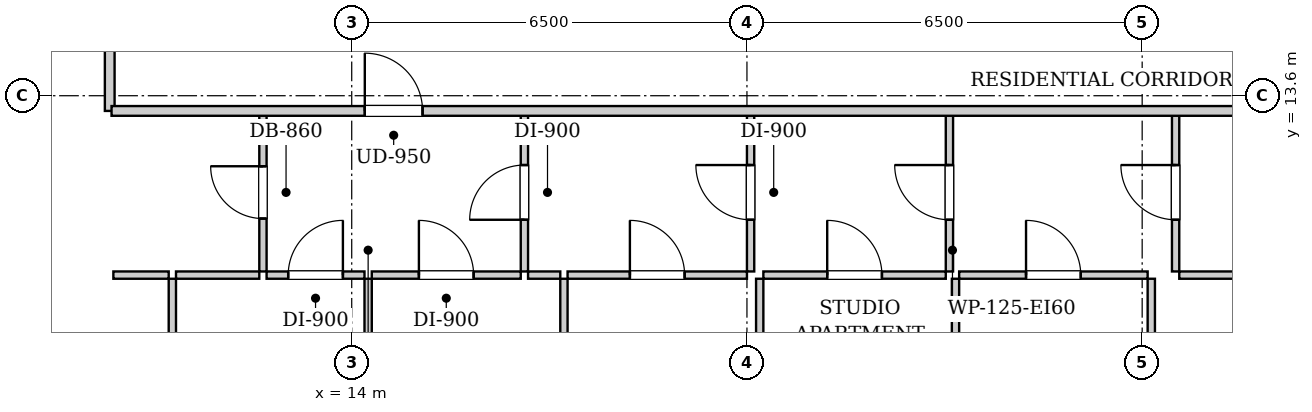
"""IFC4 building model, lengths in metres.
Left out: names, types, materials, properties, quantities, classifications, styles, units other than length and angle.
Written with IfcOpenShell. Run it as: python <this file> out.ifc"""

import sys

from ifc_helpers import new_model, si_unit, direction, frame, frame_2d, origin, place, context, subcontext, project, spatial, rectangle, extrude, element, fill, save


model = new_model("IFC4")
c1 = context("Model", 3, precision=1e-05, world=origin(), true_north=direction((0.0, 1.0)))
c2 = subcontext(c1, "Body", "Model", "MODEL_VIEW")
j1 = project(units=[si_unit("LENGTHUNIT", "METRE"), si_unit("PLANEANGLEUNIT", "RADIAN")], contexts=[c1])
p1 = place(None, origin())
s1 = spatial("IfcSite", under=j1, at=p1, CompositionType="ELEMENT")
p2 = place(p1, origin())
s2 = spatial("IfcBuilding", under=s1, at=p2, CompositionType="ELEMENT")
p3 = place(p2, frame((0.0, 0.0, 29.0)))
s3 = spatial("IfcBuildingStorey", under=s2, at=p3, CompositionType="ELEMENT", Elevation=29.0)
p4 = place(p3, frame((10.02, 13.35, 0.0), z_axis=(0.0, 0.0, 1.0), x_axis=(0.0, 1.0, 0.0)))
e1 = element("IfcWall", 1, at=p4, inside=s3, PredefinedType="PARTITIONING", context=c2, shape_type="SweptSolid", body=[
    extrude(rectangle(XDim=1.74, YDim=0.16, at=frame_2d((0.87, 0.0))), origin(), (0.0, 0.0, 1.0), 2.94),
])
p5 = place(p3, frame((12.54, 10.71, 0.0), z_axis=(0.0, 0.0, 1.0), x_axis=(0.0, 1.0, 0.0)))
e2 = element("IfcWall", 2, at=p5, inside=s3, PredefinedType="PARTITIONING", context=c2, shape_type="SweptSolid", body=[
    extrude(rectangle(XDim=2.6, YDim=0.12, at=frame_2d((1.3, 0.0))), origin(), (0.0, 0.0, 1.0), 2.94),
])
p6 = place(p5, frame((0.87, 0.0, 0.0)))
e3 = element("IfcOpeningElement", 3, at=p6, cuts=e2, PredefinedType="OPENING", context=c2, shape_type="SweptSolid", body=[
    extrude(rectangle(XDim=0.86, YDim=2.05, at=frame_2d((0.43, 1.025))), frame((0.0, 0.07, 0.0), z_axis=(0.0, -1.0, 0.0), x_axis=(1.0, 0.0, 0.0)), (0.0, 0.0, 1.0), 0.14),
])
p7 = place(p3, frame((10.08, 10.65, 0.0), z_axis=(0.0, 0.0, 1.0), x_axis=(1.0, 0.0, 0.0)))
e4 = element("IfcWall", 4, at=p7, inside=s3, PredefinedType="PARTITIONING", context=c2, shape_type="SweptSolid", body=[
    extrude(rectangle(XDim=0.91, YDim=0.12, at=frame_2d((0.455, 0.0))), origin(), (0.0, 0.0, 1.0), 2.94),
])
p8 = place(p3, frame((11.11, 10.65, 0.0), z_axis=(0.0, 0.0, 1.0), x_axis=(1.0, 0.0, 0.0)))
e5 = element("IfcWall", 5, at=p8, inside=s3, PredefinedType="PARTITIONING", context=c2, shape_type="SweptSolid", body=[
    extrude(rectangle(XDim=1.37, YDim=0.12, at=frame_2d((0.685, 0.0))), origin(), (0.0, 0.0, 1.0), 2.94),
])
p9 = place(p3, frame((16.84, 10.71, 0.0), z_axis=(0.0, 0.0, 1.0), x_axis=(0.0, 1.0, 0.0)))
e6 = element("IfcWall", 6, at=p9, inside=s3, PredefinedType="PARTITIONING", context=c2, shape_type="SweptSolid", body=[
    extrude(rectangle(XDim=2.6, YDim=0.12, at=frame_2d((1.3, 0.0))), origin(), (0.0, 0.0, 1.0), 2.94),
])
p10 = place(p9, frame((0.85, 0.0, 0.0)))
e7 = element("IfcOpeningElement", 7, at=p10, cuts=e6, PredefinedType="OPENING", context=c2, shape_type="SweptSolid", body=[
    extrude(rectangle(XDim=0.9, YDim=2.05, at=frame_2d((0.45, 1.025))), frame((0.0, 0.07, 0.0), z_axis=(0.0, -1.0, 0.0), x_axis=(1.0, 0.0, 0.0)), (0.0, 0.0, 1.0), 0.14),
])
p11 = place(p3, frame((12.6, 10.65, 0.0), z_axis=(0.0, 0.0, 1.0), x_axis=(1.0, 0.0, 0.0)))
e8 = element("IfcWall", 8, at=p11, inside=s3, PredefinedType="PARTITIONING", context=c2, shape_type="SweptSolid", body=[
    extrude(rectangle(XDim=1.61, YDim=0.12, at=frame_2d((0.805, 0.0))), origin(), (0.0, 0.0, 1.0), 2.94),
])
p12 = place(p11, frame((0.355, 0.0, 0.0)))
e9 = element("IfcOpeningElement", 9, at=p12, cuts=e8, PredefinedType="OPENING", context=c2, shape_type="SweptSolid", body=[
    extrude(rectangle(XDim=0.9, YDim=2.05, at=frame_2d((0.45, 1.025))), frame((0.0, 0.07, 0.0), z_axis=(0.0, -1.0, 0.0), x_axis=(1.0, 0.0, 0.0)), (0.0, 0.0, 1.0), 0.14),
])
p13 = place(p3, frame((14.33, 10.65, 0.0), z_axis=(0.0, 0.0, 1.0), x_axis=(1.0, 0.0, 0.0)))
e10 = element("IfcWall", 10, at=p13, inside=s3, PredefinedType="PARTITIONING", context=c2, shape_type="SweptSolid", body=[
    extrude(rectangle(XDim=2.45, YDim=0.12, at=frame_2d((1.225, 0.0))), origin(), (0.0, 0.0, 1.0), 2.94),
])
p14 = place(p13, frame((0.775, 0.0, 0.0)))
e11 = element("IfcOpeningElement", 11, at=p14, cuts=e10, PredefinedType="OPENING", context=c2, shape_type="SweptSolid", body=[
    extrude(rectangle(XDim=0.9, YDim=2.05, at=frame_2d((0.45, 1.025))), frame((0.0, 0.07, 0.0), z_axis=(0.0, -1.0, 0.0), x_axis=(1.0, 0.0, 0.0)), (0.0, 0.0, 1.0), 0.14),
])
p15 = place(p3, frame((20.56, 10.71, 0.0), z_axis=(0.0, 0.0, 1.0), x_axis=(0.0, 1.0, 0.0)))
e12 = element("IfcWall", 12, at=p15, inside=s3, PredefinedType="PARTITIONING", context=c2, shape_type="SweptSolid", body=[
    extrude(rectangle(XDim=2.6, YDim=0.12, at=frame_2d((1.3, 0.0))), origin(), (0.0, 0.0, 1.0), 2.94),
])
p16 = place(p15, frame((0.85, 0.0, 0.0)))
e13 = element("IfcOpeningElement", 13, at=p16, cuts=e12, PredefinedType="OPENING", context=c2, shape_type="SweptSolid", body=[
    extrude(rectangle(XDim=0.9, YDim=2.05, at=frame_2d((0.45, 1.025))), frame((0.0, 0.07, 0.0), z_axis=(0.0, -1.0, 0.0), x_axis=(1.0, 0.0, 0.0)), (0.0, 0.0, 1.0), 0.14),
])
p17 = place(p3, frame((16.9, 10.65, 0.0), z_axis=(0.0, 0.0, 1.0), x_axis=(1.0, 0.0, 0.0)))
e14 = element("IfcWall", 14, at=p17, inside=s3, PredefinedType="PARTITIONING", context=c2, shape_type="SweptSolid", body=[
    extrude(rectangle(XDim=0.53, YDim=0.12, at=frame_2d((0.265, 0.0))), origin(), (0.0, 0.0, 1.0), 2.94),
])
p18 = place(p3, frame((17.55, 10.65, 0.0), z_axis=(0.0, 0.0, 1.0), x_axis=(1.0, 0.0, 0.0)))
e15 = element("IfcWall", 15, at=p18, inside=s3, PredefinedType="PARTITIONING", context=c2, shape_type="SweptSolid", body=[
    extrude(rectangle(XDim=2.95, YDim=0.12, at=frame_2d((1.475, 0.0))), origin(), (0.0, 0.0, 1.0), 2.94),
])
p19 = place(p18, frame((1.025, 0.0, 0.0)))
e16 = element("IfcOpeningElement", 16, at=p19, cuts=e15, PredefinedType="OPENING", context=c2, shape_type="SweptSolid", body=[
    extrude(rectangle(XDim=0.9, YDim=2.05, at=frame_2d((0.45, 1.025))), frame((0.0, 0.07, 0.0), z_axis=(0.0, -1.0, 0.0), x_axis=(1.0, 0.0, 0.0)), (0.0, 0.0, 1.0), 0.14),
])
p20 = place(p3, frame((23.83, 10.71, 0.0), z_axis=(0.0, 0.0, 1.0), x_axis=(0.0, 1.0, 0.0)))
e17 = element("IfcWall", 17, at=p20, inside=s3, PredefinedType="PARTITIONING", context=c2, shape_type="SweptSolid", body=[
    extrude(rectangle(XDim=2.6, YDim=0.12, at=frame_2d((1.3, 0.0))), origin(), (0.0, 0.0, 1.0), 2.94),
])
p21 = place(p20, frame((0.85, 0.0, 0.0)))
e18 = element("IfcOpeningElement", 18, at=p21, cuts=e17, PredefinedType="OPENING", context=c2, shape_type="SweptSolid", body=[
    extrude(rectangle(XDim=0.9, YDim=2.05, at=frame_2d((0.45, 1.025))), frame((0.0, 0.07, 0.0), z_axis=(0.0, -1.0, 0.0), x_axis=(1.0, 0.0, 0.0)), (0.0, 0.0, 1.0), 0.14),
])
p22 = place(p3, frame((20.77, 10.65, 0.0), z_axis=(0.0, 0.0, 1.0), x_axis=(1.0, 0.0, 0.0)))
e19 = element("IfcWall", 19, at=p22, inside=s3, PredefinedType="PARTITIONING", context=c2, shape_type="SweptSolid", body=[
    extrude(rectangle(XDim=3.0, YDim=0.12, at=frame_2d((1.5, 0.0))), origin(), (0.0, 0.0, 1.0), 2.94),
])
p23 = place(p22, frame((1.05, 0.0, 0.0)))
e20 = element("IfcOpeningElement", 20, at=p23, cuts=e19, PredefinedType="OPENING", context=c2, shape_type="SweptSolid", body=[
    extrude(rectangle(XDim=0.9, YDim=2.05, at=frame_2d((0.45, 1.025))), frame((0.0, 0.07, 0.0), z_axis=(0.0, -1.0, 0.0), x_axis=(1.0, 0.0, 0.0)), (0.0, 0.0, 1.0), 0.14),
])
p24 = place(p3, frame((27.55, 10.71, 0.0), z_axis=(0.0, 0.0, 1.0), x_axis=(0.0, 1.0, 0.0)))
e21 = element("IfcWall", 21, at=p24, inside=s3, PredefinedType="PARTITIONING", context=c2, shape_type="SweptSolid", body=[
    extrude(rectangle(XDim=2.6, YDim=0.12, at=frame_2d((1.3, 0.0))), origin(), (0.0, 0.0, 1.0), 2.94),
])
p25 = place(p24, frame((0.85, 0.0, 0.0)))
e22 = element("IfcOpeningElement", 22, at=p25, cuts=e21, PredefinedType="OPENING", context=c2, shape_type="SweptSolid", body=[
    extrude(rectangle(XDim=0.9, YDim=2.05, at=frame_2d((0.45, 1.025))), frame((0.0, 0.07, 0.0), z_axis=(0.0, -1.0, 0.0), x_axis=(1.0, 0.0, 0.0)), (0.0, 0.0, 1.0), 0.14),
])
p26 = place(p3, frame((23.99, 10.65, 0.0), z_axis=(0.0, 0.0, 1.0), x_axis=(1.0, 0.0, 0.0)))
e23 = element("IfcWall", 23, at=p26, inside=s3, PredefinedType="PARTITIONING", context=c2, shape_type="SweptSolid", body=[
    extrude(rectangle(XDim=3.1, YDim=0.12, at=frame_2d((1.55, 0.0))), origin(), (0.0, 0.0, 1.0), 2.94),
])
p27 = place(p26, frame((1.1, 0.0, 0.0)))
e24 = element("IfcOpeningElement", 24, at=p27, cuts=e23, PredefinedType="OPENING", context=c2, shape_type="SweptSolid", body=[
    extrude(rectangle(XDim=0.9, YDim=2.05, at=frame_2d((0.45, 1.025))), frame((0.0, 0.07, 0.0), z_axis=(0.0, -1.0, 0.0), x_axis=(1.0, 0.0, 0.0)), (0.0, 0.0, 1.0), 0.14),
])
p28 = place(p3, frame((27.61, 10.65, 0.0), z_axis=(0.0, 0.0, 1.0), x_axis=(1.0, 0.0, 0.0)))
e25 = element("IfcWall", 25, at=p28, inside=s3, PredefinedType="PARTITIONING", context=c2, shape_type="SweptSolid", body=[
    extrude(rectangle(XDim=2.7, YDim=0.12, at=frame_2d((1.35, 0.0))), origin(), (0.0, 0.0, 1.0), 2.94),
])
p29 = place(p28, frame((0.9, 0.0, 0.0)))
e26 = element("IfcOpeningElement", 26, at=p29, cuts=e25, PredefinedType="OPENING", context=c2, shape_type="SweptSolid", body=[
    extrude(rectangle(XDim=0.9, YDim=2.05, at=frame_2d((0.45, 1.025))), frame((0.0, 0.07, 0.0), z_axis=(0.0, -1.0, 0.0), x_axis=(1.0, 0.0, 0.0)), (0.0, 0.0, 1.0), 0.14),
])
p30 = place(p3, frame((11.05, 0.28, 0.0), z_axis=(0.0, 0.0, 1.0), x_axis=(0.0, 1.0, 0.0)))
e27 = element("IfcWall", 27, at=p30, inside=s3, PredefinedType="PARTITIONING", context=c2, shape_type="SweptSolid", body=[
    extrude(rectangle(XDim=10.31, YDim=0.12, at=frame_2d((5.155, 0.0))), origin(), (0.0, 0.0, 1.0), 2.94),
])
p31 = place(p30, frame((4.69, 0.0, 0.0)))
e28 = element("IfcOpeningElement", 28, at=p31, cuts=e27, PredefinedType="OPENING", context=c2, shape_type="SweptSolid", body=[
    extrude(rectangle(XDim=0.9, YDim=2.05, at=frame_2d((0.45, 1.025))), frame((0.0, 0.07, 0.0), z_axis=(0.0, -1.0, 0.0), x_axis=(1.0, 0.0, 0.0)), (0.0, 0.0, 1.0), 0.14),
])
p32 = place(p3, frame((14.27, 2.43, 0.0), z_axis=(0.0, 0.0, 1.0), x_axis=(0.0, 1.0, 0.0)))
e29 = element("IfcWall", 29, at=p32, inside=s3, PredefinedType="PARTITIONING", context=c2, shape_type="SweptSolid", body=[
    extrude(rectangle(XDim=8.16, YDim=0.12, at=frame_2d((4.08, 0.0))), origin(), (0.0, 0.0, 1.0), 2.94),
])
p33 = place(p32, frame((3.63, 0.0, 0.0)))
e30 = element("IfcOpeningElement", 30, at=p33, cuts=e29, PredefinedType="OPENING", context=c2, shape_type="SweptSolid", body=[
    extrude(rectangle(XDim=0.9, YDim=2.05, at=frame_2d((0.45, 1.025))), frame((0.0, 0.07, 0.0), z_axis=(0.0, -1.0, 0.0), x_axis=(1.0, 0.0, 0.0)), (0.0, 0.0, 1.0), 0.14),
])
p34 = place(p3, frame((17.49, 0.28, 0.0), z_axis=(0.0, 0.0, 1.0), x_axis=(0.0, 1.0, 0.0)))
e31 = element("IfcWall", 31, at=p34, inside=s3, PredefinedType="PARTITIONING", context=c2, shape_type="SweptSolid", body=[
    extrude(rectangle(XDim=10.31, YDim=0.12, at=frame_2d((5.155, 0.0))), origin(), (0.0, 0.0, 1.0), 2.94),
])
p35 = place(p34, frame((4.69, 0.0, 0.0)))
e32 = element("IfcOpeningElement", 32, at=p35, cuts=e31, PredefinedType="OPENING", context=c2, shape_type="SweptSolid", body=[
    extrude(rectangle(XDim=0.9, YDim=2.05, at=frame_2d((0.45, 1.025))), frame((0.0, 0.07, 0.0), z_axis=(0.0, -1.0, 0.0), x_axis=(1.0, 0.0, 0.0)), (0.0, 0.0, 1.0), 0.14),
])
p36 = place(p3, frame((20.71, 0.28, 0.0), z_axis=(0.0, 0.0, 1.0), x_axis=(0.0, 1.0, 0.0)))
e33 = element("IfcWall", 33, at=p36, inside=s3, PredefinedType="PARTITIONING", context=c2, shape_type="SweptSolid", body=[
    extrude(rectangle(XDim=10.31, YDim=0.12, at=frame_2d((5.155, 0.0))), origin(), (0.0, 0.0, 1.0), 2.94),
])
p37 = place(p36, frame((4.69, 0.0, 0.0)))
e34 = element("IfcOpeningElement", 34, at=p37, cuts=e33, PredefinedType="OPENING", context=c2, shape_type="SweptSolid", body=[
    extrude(rectangle(XDim=0.9, YDim=2.05, at=frame_2d((0.45, 1.025))), frame((0.0, 0.07, 0.0), z_axis=(0.0, -1.0, 0.0), x_axis=(1.0, 0.0, 0.0)), (0.0, 0.0, 1.0), 0.14),
])
p38 = place(p3, frame((23.93, 0.28, 0.0), z_axis=(0.0, 0.0, 1.0), x_axis=(0.0, 1.0, 0.0)))
e35 = element("IfcWall", 35, at=p38, inside=s3, PredefinedType="PARTITIONING", context=c2, shape_type="SweptSolid", body=[
    extrude(rectangle(XDim=10.31, YDim=0.12, at=frame_2d((5.155, 0.0))), origin(), (0.0, 0.0, 1.0), 2.94),
])
p39 = place(p38, frame((4.69, 0.0, 0.0)))
e36 = element("IfcOpeningElement", 36, at=p39, cuts=e35, PredefinedType="OPENING", context=c2, shape_type="SweptSolid", body=[
    extrude(rectangle(XDim=0.9, YDim=2.05, at=frame_2d((0.45, 1.025))), frame((0.0, 0.07, 0.0), z_axis=(0.0, -1.0, 0.0), x_axis=(1.0, 0.0, 0.0)), (0.0, 0.0, 1.0), 0.14),
])
p40 = place(p3, frame((27.15, 0.28, 0.0), z_axis=(0.0, 0.0, 1.0), x_axis=(0.0, 1.0, 0.0)))
e37 = element("IfcWall", 37, at=p40, inside=s3, PredefinedType="PARTITIONING", context=c2, shape_type="SweptSolid", body=[
    extrude(rectangle(XDim=10.31, YDim=0.12, at=frame_2d((5.155, 0.0))), origin(), (0.0, 0.0, 1.0), 2.94),
])
p41 = place(p40, frame((4.69, 0.0, 0.0)))
e38 = element("IfcOpeningElement", 38, at=p41, cuts=e37, PredefinedType="OPENING", context=c2, shape_type="SweptSolid", body=[
    extrude(rectangle(XDim=0.9, YDim=2.05, at=frame_2d((0.45, 1.025))), frame((0.0, 0.07, 0.0), z_axis=(0.0, -1.0, 0.0), x_axis=(1.0, 0.0, 0.0)), (0.0, 0.0, 1.0), 0.14),
])
p42 = place(p3, frame((10.05, 13.35, 0.0), z_axis=(0.0, 0.0, 1.0), x_axis=(1.0, 0.0, 0.0)))
e39 = element("IfcWall", 39, at=p42, inside=s3, PredefinedType="PARTITIONING", context=c2, shape_type="SweptSolid", body=[
    extrude(rectangle(XDim=33.9, YDim=0.16, at=frame_2d((16.95, 0.0))), origin(), (0.0, 0.0, 1.0), 2.94),
])
p43 = place(p42, frame((4.165, 0.0, 0.0)))
e40 = element("IfcOpeningElement", 40, at=p43, cuts=e39, PredefinedType="OPENING", context=c2, shape_type="SweptSolid", body=[
    extrude(rectangle(XDim=0.95, YDim=2.1, at=frame_2d((0.475, 1.05))), frame((0.0, 0.09, 0.0), z_axis=(0.0, -1.0, 0.0), x_axis=(1.0, 0.0, 0.0)), (0.0, 0.0, 1.0), 0.18),
])
p44 = place(p6, origin())
e41 = element("IfcDoor", 41, at=p44, inside=s3, OperationType="SINGLE_SWING_RIGHT", PredefinedType="DOOR", context=c2, shape_type="SweptSolid", body=[
    extrude(rectangle(XDim=0.86, YDim=2.05, at=frame_2d((0.43, 1.025))), frame((0.0, 0.025, 0.0), z_axis=(0.0, -1.0, 0.0), x_axis=(1.0, 0.0, 0.0)), (0.0, 0.0, 1.0), 0.05),
])
fill(e3, e41)
p45 = place(p10, origin())
e42 = element("IfcDoor", 42, at=p45, inside=s3, OperationType="SINGLE_SWING_LEFT", PredefinedType="DOOR", context=c2, shape_type="SweptSolid", body=[
    extrude(rectangle(XDim=0.9, YDim=2.05, at=frame_2d((0.45, 1.025))), frame((0.0, 0.025, 0.0), z_axis=(0.0, -1.0, 0.0), x_axis=(1.0, 0.0, 0.0)), (0.0, 0.0, 1.0), 0.05),
])
fill(e7, e42)
p46 = place(p12, origin())
e43 = element("IfcDoor", 43, at=p46, inside=s3, OperationType="SINGLE_SWING_RIGHT", PredefinedType="DOOR", context=c2, shape_type="SweptSolid", body=[
    extrude(rectangle(XDim=0.9, YDim=2.05, at=frame_2d((0.45, 1.025))), frame((0.0, 0.025, 0.0), z_axis=(0.0, -1.0, 0.0), x_axis=(1.0, 0.0, 0.0)), (0.0, 0.0, 1.0), 0.05),
])
fill(e9, e43)
p47 = place(p14, origin())
e44 = element("IfcDoor", 44, at=p47, inside=s3, OperationType="SINGLE_SWING_LEFT", PredefinedType="DOOR", context=c2, shape_type="SweptSolid", body=[
    extrude(rectangle(XDim=0.9, YDim=2.05, at=frame_2d((0.45, 1.025))), frame((0.0, 0.025, 0.0), z_axis=(0.0, -1.0, 0.0), x_axis=(1.0, 0.0, 0.0)), (0.0, 0.0, 1.0), 0.05),
])
fill(e11, e44)
p48 = place(p16, origin())
e45 = element("IfcDoor", 45, at=p48, inside=s3, OperationType="SINGLE_SWING_RIGHT", PredefinedType="DOOR", context=c2, shape_type="SweptSolid", body=[
    extrude(rectangle(XDim=0.9, YDim=2.05, at=frame_2d((0.45, 1.025))), frame((0.0, 0.025, 0.0), z_axis=(0.0, -1.0, 0.0), x_axis=(1.0, 0.0, 0.0)), (0.0, 0.0, 1.0), 0.05),
])
fill(e13, e45)
p49 = place(p19, origin())
e46 = element("IfcDoor", 46, at=p49, inside=s3, OperationType="SINGLE_SWING_LEFT", PredefinedType="DOOR", context=c2, shape_type="SweptSolid", body=[
    extrude(rectangle(XDim=0.9, YDim=2.05, at=frame_2d((0.45, 1.025))), frame((0.0, 0.025, 0.0), z_axis=(0.0, -1.0, 0.0), x_axis=(1.0, 0.0, 0.0)), (0.0, 0.0, 1.0), 0.05),
])
fill(e16, e46)
p50 = place(p21, origin())
e47 = element("IfcDoor", 47, at=p50, inside=s3, OperationType="SINGLE_SWING_RIGHT", PredefinedType="DOOR", context=c2, shape_type="SweptSolid", body=[
    extrude(rectangle(XDim=0.9, YDim=2.05, at=frame_2d((0.45, 1.025))), frame((0.0, 0.025, 0.0), z_axis=(0.0, -1.0, 0.0), x_axis=(1.0, 0.0, 0.0)), (0.0, 0.0, 1.0), 0.05),
])
fill(e18, e47)
p51 = place(p23, origin())
e48 = element("IfcDoor", 48, at=p51, inside=s3, OperationType="SINGLE_SWING_LEFT", PredefinedType="DOOR", context=c2, shape_type="SweptSolid", body=[
    extrude(rectangle(XDim=0.9, YDim=2.05, at=frame_2d((0.45, 1.025))), frame((0.0, 0.025, 0.0), z_axis=(0.0, -1.0, 0.0), x_axis=(1.0, 0.0, 0.0)), (0.0, 0.0, 1.0), 0.05),
])
fill(e20, e48)
p52 = place(p25, origin())
e49 = element("IfcDoor", 49, at=p52, inside=s3, OperationType="SINGLE_SWING_RIGHT", PredefinedType="DOOR", context=c2, shape_type="SweptSolid", body=[
    extrude(rectangle(XDim=0.9, YDim=2.05, at=frame_2d((0.45, 1.025))), frame((0.0, 0.025, 0.0), z_axis=(0.0, -1.0, 0.0), x_axis=(1.0, 0.0, 0.0)), (0.0, 0.0, 1.0), 0.05),
])
fill(e22, e49)
p53 = place(p27, origin())
e50 = element("IfcDoor", 50, at=p53, inside=s3, OperationType="SINGLE_SWING_LEFT", PredefinedType="DOOR", context=c2, shape_type="SweptSolid", body=[
    extrude(rectangle(XDim=0.9, YDim=2.05, at=frame_2d((0.45, 1.025))), frame((0.0, 0.025, 0.0), z_axis=(0.0, -1.0, 0.0), x_axis=(1.0, 0.0, 0.0)), (0.0, 0.0, 1.0), 0.05),
])
fill(e24, e50)
p54 = place(p43, origin())
e51 = element("IfcDoor", 51, at=p54, inside=s3, OperationType="SINGLE_SWING_LEFT", PredefinedType="DOOR", context=c2, shape_type="SweptSolid", body=[
    extrude(rectangle(XDim=0.95, YDim=2.1, at=frame_2d((0.475, 1.05))), frame((0.0, 0.025, 0.0), z_axis=(0.0, -1.0, 0.0), x_axis=(1.0, 0.0, 0.0)), (0.0, 0.0, 1.0), 0.05),
])
fill(e40, e51)
save(model, sys.argv[1])
